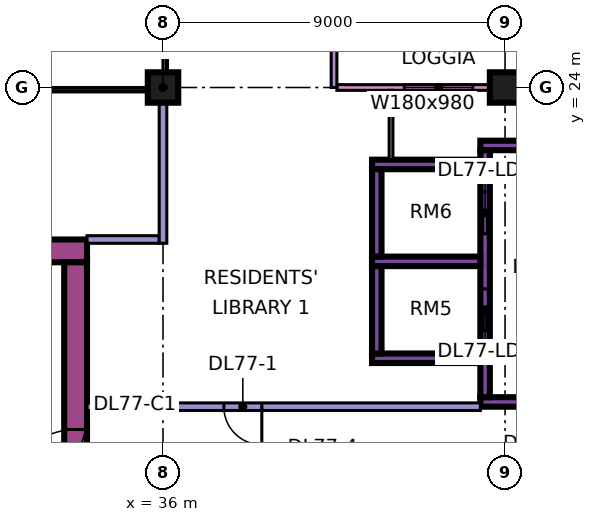
"""IFC4 building model, lengths in metres.
Left out: names, types, materials, properties, quantities, classifications, styles, units other than length and angle.
Written with IfcOpenShell. Run it as: python <this file> out.ifc"""

import sys

from ifc_helpers import new_model, si_unit, direction, frame, frame_2d, origin, origin_2d, place, context, subcontext, project, spatial, rectangle, extrude, element, fill, save


model = new_model("IFC4")
c1 = context("Model", 3, precision=1e-05, world=origin(), true_north=direction((0.0, 1.0)))
c2 = subcontext(c1, "Body", "Model", "MODEL_VIEW")
j1 = project(units=[si_unit("LENGTHUNIT", "METRE"), si_unit("PLANEANGLEUNIT", "RADIAN")], contexts=[c1])
p1 = place(None, origin())
s1 = spatial("IfcSite", under=j1, at=p1, CompositionType="ELEMENT")
p2 = place(p1, origin())
s2 = spatial("IfcBuilding", under=s1, at=p2, CompositionType="ELEMENT")
p3 = place(p2, frame((0.0, 0.0, 327.65)))
s3 = spatial("IfcBuildingStorey", under=s2, at=p3, CompositionType="ELEMENT", Elevation=327.65)
for number, where, z_axis, x_axis in (
    (1, (36.0, 24.0, 0.0), (0.0, 0.0, 1.0), (1.0, 0.0, 0.0)),
    (2, (45.0, 24.0, 0.0), (0.0, 0.0, 1.0), (1.0, 0.0, 0.0)),
):
    element("IfcColumn", number, at=place(p3, frame(where, z_axis=z_axis, x_axis=x_axis)), inside=s3, PredefinedType="COLUMN", context=c2, shape_type="SweptSolid", body=[
        extrude(rectangle(XDim=0.8, YDim=0.8, at=origin_2d()), origin(), (0.0, 0.0, 1.0), 11.25),
    ])
p4 = place(p3, frame((9.0, 19.7, 0.0), z_axis=(0.0, 0.0, 1.0), x_axis=(1.0, 0.0, 0.0)))
e3 = element("IfcWall", 3, at=p4, inside=s3, PredefinedType="SHEAR", context=c2, shape_type="SweptSolid", body=[
    extrude(rectangle(XDim=25.0, YDim=0.6, at=frame_2d((12.5, 0.0))), origin(), (0.0, 0.0, 1.0), 11.25),
])
p5 = place(p4, frame((19.1, 0.0, 0.0)))
e4 = element("IfcOpeningElement", 4, at=p5, cuts=e3, PredefinedType="OPENING", context=c2, shape_type="SweptSolid", body=[
    extrude(rectangle(XDim=1.8, YDim=2.4, at=frame_2d((0.9, 1.2))), frame((0.0, 0.31, 0.0), z_axis=(0.0, -1.0, 0.0), x_axis=(1.0, 0.0, 0.0)), (0.0, 0.0, 1.0), 0.62),
])
p6 = place(p3, frame((33.7, 7.6, 0.0), z_axis=(0.0, 0.0, 1.0), x_axis=(0.0, 1.0, 0.0)))
e5 = element("IfcWall", 5, at=p6, inside=s3, PredefinedType="SHEAR", context=c2, shape_type="SweptSolid", body=[
    extrude(rectangle(XDim=11.8, YDim=0.6, at=frame_2d((5.9, 0.0))), origin(), (0.0, 0.0, 1.0), 11.25),
])
p7 = place(p6, frame((5.6, 0.0, 0.0)))
e6 = element("IfcOpeningElement", 6, at=p7, cuts=e5, PredefinedType="OPENING", context=c2, shape_type="SweptSolid", body=[
    extrude(rectangle(XDim=1.8, YDim=2.4, at=frame_2d((0.9, 1.2))), frame((0.0, 0.31, 0.0), z_axis=(0.0, -1.0, 0.0), x_axis=(1.0, 0.0, 0.0)), (0.0, 0.0, 1.0), 0.62),
])
p8 = place(p3, frame((44.35, 15.725, 0.0), z_axis=(0.0, 0.0, 1.0), x_axis=(1.0, 0.0, 0.0)))
e7 = element("IfcWall", 7, at=p8, inside=s3, PredefinedType="SHEAR", context=c2, shape_type="SweptSolid", body=[
    extrude(rectangle(XDim=3.425, YDim=0.25, at=frame_2d((1.712, 0.0))), origin(), (0.0, 0.0, 1.0), 11.25),
])
p9 = place(p8, frame((1.25, 0.0, 0.0)))
e8 = element("IfcOpeningElement", 8, at=p9, cuts=e7, PredefinedType="OPENING", context=c2, shape_type="SweptSolid", body=[
    extrude(rectangle(XDim=1.2, YDim=2.2, at=frame_2d((0.6, 1.1))), frame((0.0, 0.135, 0.0), z_axis=(0.0, -1.0, 0.0), x_axis=(1.0, 0.0, 0.0)), (0.0, 0.0, 1.0), 0.27),
])
p10 = place(p3, frame((44.35, 22.475, 0.0), z_axis=(0.0, 0.0, 1.0), x_axis=(1.0, 0.0, 0.0)))
e9 = element("IfcWall", 9, at=p10, inside=s3, PredefinedType="SHEAR", context=c2, shape_type="SweptSolid", body=[
    extrude(rectangle(XDim=3.425, YDim=0.25, at=frame_2d((1.712, 0.0))), origin(), (0.0, 0.0, 1.0), 11.25),
])
p11 = place(p3, frame((44.475, 15.85, 0.0), z_axis=(0.0, 0.0, 1.0), x_axis=(0.0, 1.0, 0.0)))
e10 = element("IfcWall", 10, at=p11, inside=s3, PredefinedType="SHEAR", context=c2, shape_type="SweptSolid", body=[
    extrude(rectangle(XDim=6.5, YDim=0.25, at=frame_2d((3.25, 0.0))), origin(), (0.0, 0.0, 1.0), 11.25),
])
p12 = place(p11, frame((1.75, 0.0, 0.0)))
e11 = element("IfcOpeningElement", 11, at=p12, cuts=e10, PredefinedType="OPENING", context=c2, shape_type="SweptSolid", body=[
    extrude(rectangle(XDim=1.1, YDim=2.2, at=frame_2d((0.55, 1.1))), frame((0.0, 0.135, 0.0), z_axis=(0.0, -1.0, 0.0), x_axis=(1.0, 0.0, 0.0)), (0.0, 0.0, 1.0), 0.27),
])
p13 = place(p11, frame((4.3, 0.0, 0.0)))
e12 = element("IfcOpeningElement", 12, at=p13, cuts=e10, PredefinedType="OPENING", context=c2, shape_type="SweptSolid", body=[
    extrude(rectangle(XDim=1.1, YDim=2.2, at=frame_2d((0.55, 1.1))), frame((0.0, 0.135, 0.0), z_axis=(0.0, -1.0, 0.0), x_axis=(1.0, 0.0, 0.0)), (0.0, 0.0, 1.0), 0.27),
])
for number, where, z_axis, x_axis in (
    (13, (41.5, 16.875, 0.0), (0.0, 0.0, 1.0), (1.0, 0.0, 0.0)),
    (14, (41.5, 19.425, 0.0), (0.0, 0.0, 1.0), (1.0, 0.0, 0.0)),
    (15, (41.5, 21.975, 0.0), (0.0, 0.0, 1.0), (1.0, 0.0, 0.0)),
):
    element("IfcWall", number, at=place(p3, frame(where, z_axis=z_axis, x_axis=x_axis)), inside=s3, PredefinedType="SHEAR", context=c2, shape_type="SweptSolid", body=[
        extrude(rectangle(XDim=2.85, YDim=0.25, at=frame_2d((1.425, 0.0))), origin(), (0.0, 0.0, 1.0), 11.25),
    ])
for number, where, z_axis, x_axis in (
    (16, (41.625, 17.0, 0.0), (0.0, 0.0, 1.0), (0.0, 1.0, 0.0)),
    (17, (41.625, 19.55, 0.0), (0.0, 0.0, 1.0), (0.0, 1.0, 0.0)),
):
    element("IfcWall", number, at=place(p3, frame(where, z_axis=z_axis, x_axis=x_axis)), inside=s3, PredefinedType="SHEAR", context=c2, shape_type="SweptSolid", body=[
        extrude(rectangle(XDim=2.3, YDim=0.25, at=frame_2d((1.15, 0.0))), origin(), (0.0, 0.0, 1.0), 11.25),
    ])
p14 = place(p3, frame((47.925, 24.0, 0.0), z_axis=(0.0, 0.0, 1.0), x_axis=(-1.0, 0.0, 0.0)))
e18 = element("IfcWall", 18, at=p14, inside=s3, PredefinedType="SOLIDWALL", context=c2, shape_type="SweptSolid", body=[
    extrude(rectangle(XDim=7.35, YDim=0.15, at=frame_2d((3.675, 0.0))), origin(), (0.0, 0.0, 1.0), 10.85),
])
p15 = place(p14, frame((0.613, 0.0, 0.45)))
e19 = element("IfcOpeningElement", 19, at=p15, cuts=e18, PredefinedType="OPENING", context=c2, shape_type="SweptSolid", body=[
    extrude(rectangle(XDim=1.2, YDim=9.8, at=frame_2d((0.6, 4.9))), frame((0.0, 0.085, 0.0), z_axis=(0.0, -1.0, 0.0), x_axis=(1.0, 0.0, 0.0)), (0.0, 0.0, 1.0), 0.17),
])
p16 = place(p14, frame((3.775, 0.0, 0.45)))
e20 = element("IfcOpeningElement", 20, at=p16, cuts=e18, PredefinedType="OPENING", context=c2, shape_type="SweptSolid", body=[
    extrude(rectangle(XDim=1.8, YDim=9.8, at=frame_2d((0.9, 4.9))), frame((0.0, 0.085, 0.0), z_axis=(0.0, -1.0, 0.0), x_axis=(1.0, 0.0, 0.0)), (0.0, 0.0, 1.0), 0.17),
])
p17 = place(p3, frame((40.5, 25.5, 0.0), z_axis=(0.0, 0.0, 1.0), x_axis=(0.0, -1.0, 0.0)))
e21 = element("IfcWall", 21, at=p17, inside=s3, PredefinedType="SOLIDWALL", context=c2, shape_type="SweptSolid", body=[
    extrude(rectangle(XDim=1.5, YDim=0.15, at=frame_2d((0.75, 0.0))), origin(), (0.0, 0.0, 1.0), 10.85),
])
p18 = place(p3, frame((34.0, 15.6, 0.0), z_axis=(0.0, 0.0, 1.0), x_axis=(1.0, 0.0, 0.0)))
e22 = element("IfcWall", 22, at=p18, inside=s3, PredefinedType="PARTITIONING", context=c2, shape_type="SweptSolid", body=[
    extrude(rectangle(XDim=10.35, YDim=0.2, at=frame_2d((5.175, 0.0))), origin(), (0.0, 0.0, 1.0), 10.85),
])
p19 = place(p18, frame((3.6, 0.0, 0.0)))
e23 = element("IfcOpeningElement", 23, at=p19, cuts=e22, PredefinedType="OPENING", context=c2, shape_type="SweptSolid", body=[
    extrude(rectangle(XDim=1.0, YDim=2.1, at=frame_2d((0.5, 1.05))), frame((0.0, 0.11, 0.0), z_axis=(0.0, -1.0, 0.0), x_axis=(1.0, 0.0, 0.0)), (0.0, 0.0, 1.0), 0.22),
])
p20 = place(p3, frame((34.0, 20.0, 0.0), z_axis=(0.0, 0.0, 1.0), x_axis=(1.0, 0.0, 0.0)))
e24 = element("IfcWall", 24, at=p20, inside=s3, PredefinedType="PARTITIONING", context=c2, shape_type="SweptSolid", body=[
    extrude(rectangle(XDim=1.9, YDim=0.2, at=frame_2d((0.95, 0.0))), origin(), (0.0, 0.0, 1.0), 10.85),
])
p21 = place(p3, frame((36.0, 19.9, 0.0), z_axis=(0.0, 0.0, 1.0), x_axis=(0.0, 1.0, 0.0)))
e25 = element("IfcWall", 25, at=p21, inside=s3, PredefinedType="PARTITIONING", context=c2, shape_type="SweptSolid", body=[
    extrude(rectangle(XDim=4.1, YDim=0.2, at=frame_2d((2.05, 0.0))), origin(), (0.0, 0.0, 1.0), 10.85),
])
p22 = place(p3, frame((42.0, 22.1, 0.0), z_axis=(0.0, 0.0, 1.0), x_axis=(0.0, 1.0, 0.0)))
e26 = element("IfcWall", 26, at=p22, inside=s3, PredefinedType="PARTITIONING", context=c2, shape_type="SweptSolid", body=[
    extrude(rectangle(XDim=1.826, YDim=0.1, at=frame_2d((0.913, 0.0))), origin(), (0.0, 0.0, 1.0), 10.85),
])
p23 = place(p16, origin())
e27 = element("IfcWindow", 27, at=p23, inside=s3, PartitioningType="SINGLE_PANEL", PredefinedType="WINDOW", context=c2, shape_type="SweptSolid", body=[
    extrude(rectangle(XDim=1.8, YDim=9.8, at=frame_2d((0.9, 4.9))), frame((0.0, 0.03, 0.0), z_axis=(0.0, -1.0, 0.0), x_axis=(1.0, 0.0, 0.0)), (0.0, 0.0, 1.0), 0.06),
])
fill(e20, e27)
p24 = place(p7, origin())
e28 = element("IfcDoor", 28, at=p24, inside=s3, OperationType="DOUBLE_DOOR_SINGLE_SWING", PredefinedType="DOOR", context=c2, shape_type="SweptSolid", body=[
    extrude(rectangle(XDim=1.8, YDim=2.4, at=frame_2d((0.9, 1.2))), frame((0.0, 0.025, 0.0), z_axis=(0.0, -1.0, 0.0), x_axis=(1.0, 0.0, 0.0)), (0.0, 0.0, 1.0), 0.05),
])
fill(e6, e28)
p25 = place(p12, origin())
e29 = element("IfcDoor", 29, at=p25, inside=s3, OperationType="DOUBLE_DOOR_SLIDING", PredefinedType="DOOR", context=c2, shape_type="SweptSolid", body=[
    extrude(rectangle(XDim=1.1, YDim=2.2, at=frame_2d((0.55, 1.1))), frame((0.0, 0.025, 0.0), z_axis=(0.0, -1.0, 0.0), x_axis=(1.0, 0.0, 0.0)), (0.0, 0.0, 1.0), 0.05),
])
fill(e11, e29)
p26 = place(p13, origin())
e30 = element("IfcDoor", 30, at=p26, inside=s3, OperationType="DOUBLE_DOOR_SLIDING", PredefinedType="DOOR", context=c2, shape_type="SweptSolid", body=[
    extrude(rectangle(XDim=1.1, YDim=2.2, at=frame_2d((0.55, 1.1))), frame((0.0, 0.025, 0.0), z_axis=(0.0, -1.0, 0.0), x_axis=(1.0, 0.0, 0.0)), (0.0, 0.0, 1.0), 0.05),
])
fill(e12, e30)
p27 = place(p19, origin())
e31 = element("IfcDoor", 31, at=p27, inside=s3, OperationType="SINGLE_SWING_RIGHT", PredefinedType="DOOR", context=c2, shape_type="SweptSolid", body=[
    extrude(rectangle(XDim=1.0, YDim=2.1, at=frame_2d((0.5, 1.05))), frame((0.0, 0.025, 0.0), z_axis=(0.0, -1.0, 0.0), x_axis=(1.0, 0.0, 0.0)), (0.0, 0.0, 1.0), 0.05),
])
fill(e23, e31)
save(model, sys.argv[1])
